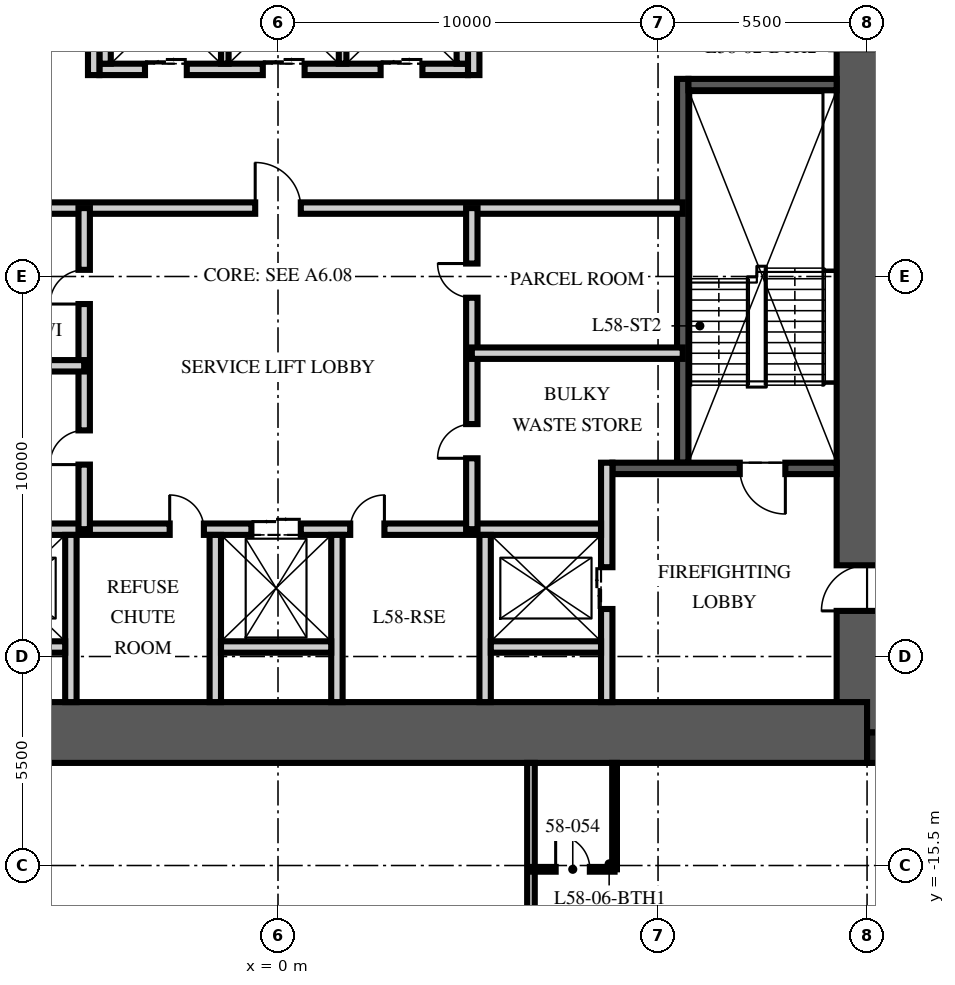
"""IFC4 building model, lengths in metres.
Left out: names, types, materials, properties, quantities, classifications, styles, units other than length and angle.
Written with IfcOpenShell. Run it as: python <this file> out.ifc"""

import sys

from ifc_helpers import new_model, si_unit, direction, frame, frame_2d, origin, origin_2d, place, context, subcontext, project, spatial, rectangle, extrude, element, fill, save


model = new_model("IFC4")
c1 = context("Model", 3, precision=1e-05, world=origin(), true_north=direction((0.0, 1.0)))
c2 = subcontext(c1, "Body", "Model", "MODEL_VIEW")
j1 = project(units=[si_unit("LENGTHUNIT", "METRE"), si_unit("PLANEANGLEUNIT", "RADIAN")], contexts=[c1])
p1 = place(None, origin())
s1 = spatial("IfcSite", under=j1, at=p1, CompositionType="ELEMENT")
p2 = place(p1, origin())
s2 = spatial("IfcBuilding", under=s1, at=p2, CompositionType="ELEMENT")
p3 = place(p2, frame((0.0, 0.0, 233.25)))
s3 = spatial("IfcBuildingStorey", under=s2, at=p3, CompositionType="ELEMENT", Elevation=233.25)
p4 = place(p3, frame((15.5, -12.0, -0.25), z_axis=(0.0, 0.0, 1.0), x_axis=(0.0, 1.0, 0.0)))
e1 = element("IfcWall", 1, at=p4, inside=s3, PredefinedType="SHEAR", context=c2, shape_type="SweptSolid", body=[
    extrude(rectangle(XDim=24.0, YDim=1.6, at=frame_2d((12.0, 0.0))), origin(), (0.0, 0.0, 1.0), 3.75),
])
p5 = place(p4, frame((3.2, 0.0, 0.25)))
e2 = element("IfcOpeningElement", 2, at=p5, cuts=e1, PredefinedType="OPENING", context=c2, shape_type="SweptSolid", body=[
    extrude(rectangle(XDim=1.2, YDim=2.1, at=frame_2d((0.6, 1.05))), frame((0.0, 0.81, 0.0), z_axis=(0.0, -1.0, 0.0), x_axis=(1.0, 0.0, 0.0)), (0.0, 0.0, 1.0), 1.62),
])
p6 = place(p4, frame((19.3, 0.0, 0.25)))
e3 = element("IfcOpeningElement", 3, at=p6, cuts=e1, PredefinedType="OPENING", context=c2, shape_type="SweptSolid", body=[
    extrude(rectangle(XDim=1.8, YDim=2.1, at=frame_2d((0.9, 1.05))), frame((0.0, 0.81, 0.0), z_axis=(0.0, -1.0, 0.0), x_axis=(1.0, 0.0, 0.0)), (0.0, 0.0, 1.0), 1.62),
])
p7 = place(p3, frame((-15.5, -12.0, -0.25), z_axis=(0.0, 0.0, 1.0), x_axis=(1.0, 0.0, 0.0)))
e4 = element("IfcWall", 4, at=p7, inside=s3, PredefinedType="SHEAR", context=c2, shape_type="SweptSolid", body=[
    extrude(rectangle(XDim=31.0, YDim=1.6, at=frame_2d((15.5, 0.0))), origin(), (0.0, 0.0, 1.0), 3.75),
])
p8 = place(p3, frame((15.9, -12.4, -0.25), z_axis=(0.0, 0.0, 1.0), x_axis=(1.0, 0.0, 0.0)))
e5 = element("IfcColumn", 5, at=p8, inside=s3, PredefinedType="COLUMN", context=c2, shape_type="SweptSolid", body=[
    extrude(rectangle(XDim=0.8, YDim=0.8, at=origin_2d()), origin(), (0.0, 0.0, 1.0), 3.75),
])
p9 = place(p3, frame((10.65, -4.9, 0.0), z_axis=(0.0, 0.0, 1.0), x_axis=(0.0, 1.0, 0.0)))
e6 = element("IfcWall", 6, at=p9, inside=s3, PredefinedType="SOLIDWALL", context=c2, shape_type="SweptSolid", body=[
    extrude(rectangle(XDim=10.1, YDim=0.3, at=frame_2d((5.05, 0.0))), origin(), (0.0, 0.0, 1.0), 3.5),
])
p10 = place(p3, frame((14.7, -5.05, 0.0), z_axis=(0.0, 0.0, 1.0), x_axis=(-1.0, 0.0, 0.0)))
e7 = element("IfcWall", 7, at=p10, inside=s3, PredefinedType="SOLIDWALL", context=c2, shape_type="SweptSolid", body=[
    extrude(rectangle(XDim=5.9, YDim=0.3, at=frame_2d((2.95, 0.0))), origin(), (0.0, 0.0, 1.0), 3.5),
])
p11 = place(p10, frame((1.35, 0.0, 0.0)))
e8 = element("IfcOpeningElement", 8, at=p11, cuts=e7, PredefinedType="OPENING", context=c2, shape_type="SweptSolid", body=[
    extrude(rectangle(XDim=1.2, YDim=2.1, at=frame_2d((0.6, 1.05))), frame((0.0, 0.16, 0.0), z_axis=(0.0, -1.0, 0.0), x_axis=(1.0, 0.0, 0.0)), (0.0, 0.0, 1.0), 0.32),
])
p12 = place(p3, frame((14.7, 5.05, 0.0), z_axis=(0.0, 0.0, 1.0), x_axis=(-1.0, 0.0, 0.0)))
e9 = element("IfcWall", 9, at=p12, inside=s3, PredefinedType="SOLIDWALL", context=c2, shape_type="SweptSolid", body=[
    extrude(rectangle(XDim=3.9, YDim=0.3, at=frame_2d((1.95, 0.0))), origin(), (0.0, 0.0, 1.0), 3.5),
])
p13 = place(p3, frame((8.65, -11.2, 0.0), z_axis=(0.0, 0.0, 1.0), x_axis=(0.0, 1.0, 0.0)))
e10 = element("IfcWall", 10, at=p13, inside=s3, PredefinedType="PARTITIONING", context=c2, shape_type="SweptSolid", body=[
    extrude(rectangle(XDim=6.3, YDim=0.3, at=frame_2d((3.15, 0.0))), origin(), (0.0, 0.0, 1.0), 3.5),
])
p14 = place(p13, frame((2.45, 0.0, 0.0)))
e11 = element("IfcOpeningElement", 11, at=p14, cuts=e10, PredefinedType="OPENING", context=c2, shape_type="SweptSolid", body=[
    extrude(rectangle(XDim=1.1, YDim=2.1, at=frame_2d((0.55, 1.05))), frame((0.0, 0.16, 0.0), z_axis=(0.0, -1.0, 0.0), x_axis=(1.0, 0.0, 0.0)), (0.0, 0.0, 1.0), 0.32),
])
p15 = place(p3, frame((-8.5, -6.65, 0.0), z_axis=(0.0, 0.0, 1.0), x_axis=(1.0, 0.0, 0.0)))
e12 = element("IfcWall", 12, at=p15, inside=s3, PredefinedType="PARTITIONING", context=c2, shape_type="SweptSolid", body=[
    extrude(rectangle(XDim=17.0, YDim=0.3, at=frame_2d((8.5, 0.0))), origin(), (0.0, 0.0, 1.0), 3.5),
])
p16 = place(p15, frame((7.8, 0.0, 0.0)))
e13 = element("IfcOpeningElement", 13, at=p16, cuts=e12, PredefinedType="OPENING", context=c2, shape_type="SweptSolid", body=[
    extrude(rectangle(XDim=1.3, YDim=2.4, at=frame_2d((0.65, 1.2))), frame((0.0, 0.16, 0.0), z_axis=(0.0, -1.0, 0.0), x_axis=(1.0, 0.0, 0.0)), (0.0, 0.0, 1.0), 0.32),
])
p17 = place(p15, frame((5.65, 0.0, 0.0)))
e14 = element("IfcOpeningElement", 14, at=p17, cuts=e12, PredefinedType="OPENING", context=c2, shape_type="SweptSolid", body=[
    extrude(rectangle(XDim=0.9, YDim=2.1, at=frame_2d((0.45, 1.05))), frame((0.0, 0.16, 0.0), z_axis=(0.0, -1.0, 0.0), x_axis=(1.0, 0.0, 0.0)), (0.0, 0.0, 1.0), 0.32),
])
p18 = place(p15, frame((10.4, 0.0, 0.0)))
e15 = element("IfcOpeningElement", 15, at=p18, cuts=e12, PredefinedType="OPENING", context=c2, shape_type="SweptSolid", body=[
    extrude(rectangle(XDim=0.9, YDim=2.1, at=frame_2d((0.45, 1.05))), frame((0.0, 0.16, 0.0), z_axis=(0.0, -1.0, 0.0), x_axis=(1.0, 0.0, 0.0)), (0.0, 0.0, 1.0), 0.32),
])
for number, where, z_axis, x_axis in (
    (16, (-5.45, -11.2, 0.0), (0.0, 0.0, 1.0), (0.0, 1.0, 0.0)),
    (17, (-1.65, -11.2, 0.0), (0.0, 0.0, 1.0), (0.0, 1.0, 0.0)),
    (18, (1.55, -11.2, 0.0), (0.0, 0.0, 1.0), (0.0, 1.0, 0.0)),
    (19, (5.45, -11.2, 0.0), (0.0, 0.0, 1.0), (0.0, 1.0, 0.0)),
):
    element("IfcWall", number, at=place(p3, frame(where, z_axis=z_axis, x_axis=x_axis)), inside=s3, PredefinedType="PARTITIONING", context=c2, shape_type="SweptSolid", body=[
        extrude(rectangle(XDim=4.4, YDim=0.3, at=frame_2d((2.2, 0.0))), origin(), (0.0, 0.0, 1.0), 3.5),
    ])
for number, where, z_axis, x_axis in (
    (20, (-8.5, -9.75, 0.0), (0.0, 0.0, 1.0), (1.0, 0.0, 0.0)),
    (21, (-1.5, -9.75, 0.0), (0.0, 0.0, 1.0), (1.0, 0.0, 0.0)),
    (22, (5.6, -9.75, 0.0), (0.0, 0.0, 1.0), (1.0, 0.0, 0.0)),
):
    element("IfcWall", number, at=place(p3, frame(where, z_axis=z_axis, x_axis=x_axis)), inside=s3, PredefinedType="PARTITIONING", context=c2, shape_type="SweptSolid", body=[
        extrude(rectangle(XDim=2.9, YDim=0.3, at=frame_2d((1.45, 0.0))), origin(), (0.0, 0.0, 1.0), 3.5),
    ])
p19 = place(p3, frame((-4.7, 5.45, 0.0), z_axis=(0.0, 0.0, 1.0), x_axis=(1.0, 0.0, 0.0)))
e23 = element("IfcWall", 23, at=p19, inside=s3, PredefinedType="PARTITIONING", context=c2, shape_type="SweptSolid", body=[
    extrude(rectangle(XDim=9.7, YDim=0.3, at=frame_2d((4.85, 0.0))), origin(), (0.0, 0.0, 1.0), 3.5),
])
p20 = place(p19, frame((1.2, 0.0, 0.0)))
e24 = element("IfcOpeningElement", 24, at=p20, cuts=e23, PredefinedType="OPENING", context=c2, shape_type="SweptSolid", body=[
    extrude(rectangle(XDim=1.1, YDim=2.1, at=frame_2d((0.55, 1.05))), frame((0.0, 0.16, 0.0), z_axis=(0.0, -1.0, 0.0), x_axis=(1.0, 0.0, 0.0)), (0.0, 0.0, 1.0), 0.32),
])
p21 = place(p19, frame((4.3, 0.0, 0.0)))
e25 = element("IfcOpeningElement", 25, at=p21, cuts=e23, PredefinedType="OPENING", context=c2, shape_type="SweptSolid", body=[
    extrude(rectangle(XDim=1.1, YDim=2.1, at=frame_2d((0.55, 1.05))), frame((0.0, 0.16, 0.0), z_axis=(0.0, -1.0, 0.0), x_axis=(1.0, 0.0, 0.0)), (0.0, 0.0, 1.0), 0.32),
])
p22 = place(p19, frame((7.4, 0.0, 0.0)))
e26 = element("IfcOpeningElement", 26, at=p22, cuts=e23, PredefinedType="OPENING", context=c2, shape_type="SweptSolid", body=[
    extrude(rectangle(XDim=1.1, YDim=2.1, at=frame_2d((0.55, 1.05))), frame((0.0, 0.16, 0.0), z_axis=(0.0, -1.0, 0.0), x_axis=(1.0, 0.0, 0.0)), (0.0, 0.0, 1.0), 0.32),
])
for number, where, z_axis, x_axis in (
    (27, (-4.55, 5.6, 0.0), (0.0, 0.0, 1.0), (0.0, 1.0, 0.0)),
    (28, (4.85, 5.6, 0.0), (0.0, 0.0, 1.0), (0.0, 1.0, 0.0)),
):
    element("IfcWall", number, at=place(p3, frame(where, z_axis=z_axis, x_axis=x_axis)), inside=s3, PredefinedType="PARTITIONING", context=c2, shape_type="SweptSolid", body=[
        extrude(rectangle(XDim=2.8, YDim=0.3, at=frame_2d((1.4, 0.0))), origin(), (0.0, 0.0, 1.0), 3.5),
    ])
for number, where, z_axis, x_axis in (
    (29, (-1.4, 5.6, 0.0), (0.0, 0.0, 1.0), (0.0, 1.0, 0.0)),
    (30, (1.7, 5.6, 0.0), (0.0, 0.0, 1.0), (0.0, 1.0, 0.0)),
):
    element("IfcWall", number, at=place(p3, frame(where, z_axis=z_axis, x_axis=x_axis)), inside=s3, PredefinedType="PARTITIONING", context=c2, shape_type="SweptSolid", body=[
        extrude(rectangle(XDim=2.8, YDim=0.2, at=frame_2d((1.4, 0.0))), origin(), (0.0, 0.0, 1.0), 3.5),
    ])
p23 = place(p3, frame((-10.65, 1.8, 0.0), z_axis=(0.0, 0.0, 1.0), x_axis=(1.0, 0.0, 0.0)))
e31 = element("IfcWall", 31, at=p23, inside=s3, PredefinedType="PARTITIONING", context=c2, shape_type="SweptSolid", body=[
    extrude(rectangle(XDim=21.3, YDim=0.3, at=frame_2d((10.65, 0.0))), origin(), (0.0, 0.0, 1.0), 3.5),
])
p24 = place(p23, frame((10.05, 0.0, 0.0)))
e32 = element("IfcOpeningElement", 32, at=p24, cuts=e31, PredefinedType="OPENING", context=c2, shape_type="SweptSolid", body=[
    extrude(rectangle(XDim=1.2, YDim=2.1, at=frame_2d((0.6, 1.05))), frame((0.0, 0.16, 0.0), z_axis=(0.0, -1.0, 0.0), x_axis=(1.0, 0.0, 0.0)), (0.0, 0.0, 1.0), 0.32),
])
p25 = place(p23, frame((0.938, 0.0, 0.0)))
e33 = element("IfcOpeningElement", 33, at=p25, cuts=e31, PredefinedType="OPENING", context=c2, shape_type="SweptSolid", body=[
    extrude(rectangle(XDim=0.9, YDim=2.1, at=frame_2d((0.45, 1.05))), frame((0.0, 0.16, 0.0), z_axis=(0.0, -1.0, 0.0), x_axis=(1.0, 0.0, 0.0)), (0.0, 0.0, 1.0), 0.32),
])
p26 = place(p3, frame((-5.1, -6.65, 0.0), z_axis=(0.0, 0.0, 1.0), x_axis=(0.0, 1.0, 0.0)))
e34 = element("IfcWall", 34, at=p26, inside=s3, PredefinedType="PARTITIONING", context=c2, shape_type="SweptSolid", body=[
    extrude(rectangle(XDim=8.45, YDim=0.3, at=frame_2d((4.225, 0.0))), origin(), (0.0, 0.0, 1.0), 3.5),
])
p27 = place(p26, frame((1.7, 0.0, 0.0)))
e35 = element("IfcOpeningElement", 35, at=p27, cuts=e34, PredefinedType="OPENING", context=c2, shape_type="SweptSolid", body=[
    extrude(rectangle(XDim=0.9, YDim=2.1, at=frame_2d((0.45, 1.05))), frame((0.0, 0.16, 0.0), z_axis=(0.0, -1.0, 0.0), x_axis=(1.0, 0.0, 0.0)), (0.0, 0.0, 1.0), 0.32),
])
p28 = place(p26, frame((5.925, 0.0, 0.0)))
e36 = element("IfcOpeningElement", 36, at=p28, cuts=e34, PredefinedType="OPENING", context=c2, shape_type="SweptSolid", body=[
    extrude(rectangle(XDim=0.9, YDim=2.1, at=frame_2d((0.45, 1.05))), frame((0.0, 0.16, 0.0), z_axis=(0.0, -1.0, 0.0), x_axis=(1.0, 0.0, 0.0)), (0.0, 0.0, 1.0), 0.32),
])
p29 = place(p3, frame((5.1, -6.65, 0.0), z_axis=(0.0, 0.0, 1.0), x_axis=(0.0, 1.0, 0.0)))
e37 = element("IfcWall", 37, at=p29, inside=s3, PredefinedType="PARTITIONING", context=c2, shape_type="SweptSolid", body=[
    extrude(rectangle(XDim=8.45, YDim=0.3, at=frame_2d((4.225, 0.0))), origin(), (0.0, 0.0, 1.0), 3.5),
])
p30 = place(p29, frame((1.866, 0.0, 0.0)))
e38 = element("IfcOpeningElement", 38, at=p30, cuts=e37, PredefinedType="OPENING", context=c2, shape_type="SweptSolid", body=[
    extrude(rectangle(XDim=0.9, YDim=2.1, at=frame_2d((0.45, 1.05))), frame((0.0, 0.16, 0.0), z_axis=(0.0, -1.0, 0.0), x_axis=(1.0, 0.0, 0.0)), (0.0, 0.0, 1.0), 0.32),
])
p31 = place(p29, frame((6.091, 0.0, 0.0)))
e39 = element("IfcOpeningElement", 39, at=p31, cuts=e37, PredefinedType="OPENING", context=c2, shape_type="SweptSolid", body=[
    extrude(rectangle(XDim=0.9, YDim=2.1, at=frame_2d((0.45, 1.05))), frame((0.0, 0.16, 0.0), z_axis=(0.0, -1.0, 0.0), x_axis=(1.0, 0.0, 0.0)), (0.0, 0.0, 1.0), 0.32),
])
for number, where, z_axis, x_axis in (
    (40, (-10.65, -2.35, 0.0), (0.0, 0.0, 1.0), (1.0, 0.0, 0.0)),
    (41, (10.65, -2.018, 0.0), (0.0, 0.0, 1.0), (-1.0, 0.0, 0.0)),
):
    element("IfcWall", number, at=place(p3, frame(where, z_axis=z_axis, x_axis=x_axis)), inside=s3, PredefinedType="PARTITIONING", context=c2, shape_type="SweptSolid", body=[
        extrude(rectangle(XDim=5.55, YDim=0.3, at=frame_2d((2.775, 0.0))), origin(), (0.0, 0.0, 1.0), 3.5),
    ])
p32 = place(p3, frame((-4.85, 5.3, 0.0), z_axis=(0.0, 0.0, 1.0), x_axis=(0.0, 1.0, 0.0)))
e42 = element("IfcWall", 42, at=p32, inside=s3, PredefinedType="PARTITIONING", context=c2, shape_type="SweptSolid", body=[
    extrude(rectangle(XDim=5.9, YDim=0.3, at=frame_2d((2.95, 0.0))), origin(), (0.0, 0.0, 1.0), 3.5),
])
p33 = place(p32, frame((4.15, 0.0, 0.0)))
e43 = element("IfcOpeningElement", 43, at=p33, cuts=e42, PredefinedType="OPENING", context=c2, shape_type="SweptSolid", body=[
    extrude(rectangle(XDim=0.9, YDim=2.1, at=frame_2d((0.45, 1.05))), frame((0.0, 0.16, 0.0), z_axis=(0.0, -1.0, 0.0), x_axis=(1.0, 0.0, 0.0)), (0.0, 0.0, 1.0), 0.32),
])
p34 = place(p3, frame((5.15, 5.3, 0.0), z_axis=(0.0, 0.0, 1.0), x_axis=(0.0, 1.0, 0.0)))
e44 = element("IfcWall", 44, at=p34, inside=s3, PredefinedType="PARTITIONING", context=c2, shape_type="SweptSolid", body=[
    extrude(rectangle(XDim=5.9, YDim=0.3, at=frame_2d((2.95, 0.0))), origin(), (0.0, 0.0, 1.0), 3.5),
])
p35 = place(p34, frame((4.15, 0.0, 0.0)))
e45 = element("IfcOpeningElement", 45, at=p35, cuts=e44, PredefinedType="OPENING", context=c2, shape_type="SweptSolid", body=[
    extrude(rectangle(XDim=0.9, YDim=2.1, at=frame_2d((0.45, 1.05))), frame((0.0, 0.16, 0.0), z_axis=(0.0, -1.0, 0.0), x_axis=(1.0, 0.0, 0.0)), (0.0, 0.0, 1.0), 0.32),
])
p36 = place(p3, frame((6.656, -12.8, 0.0), z_axis=(0.0, 0.0, 1.0), x_axis=(0.0, -1.0, 0.0)))
e46 = element("IfcWall", 46, at=p36, inside=s3, PredefinedType="PARTITIONING", context=c2, shape_type="SweptSolid", body=[
    extrude(rectangle(XDim=13.15, YDim=0.2, at=frame_2d((6.575, 0.0))), origin(), (0.0, 0.0, 1.0), 2.91),
])
p37 = place(p3, frame((6.656, -15.6, 0.0), z_axis=(0.0, 0.0, 1.0), x_axis=(1.0, 0.0, 0.0)))
e47 = element("IfcWall", 47, at=p37, inside=s3, PredefinedType="PARTITIONING", context=c2, shape_type="SweptSolid", body=[
    extrude(rectangle(XDim=2.2, YDim=0.125, at=frame_2d((1.1, 0.0))), origin(), (0.0, 0.0, 1.0), 2.6),
])
p38 = place(p37, frame((0.65, 0.0, 0.0)))
e48 = element("IfcOpeningElement", 48, at=p38, cuts=e47, PredefinedType="OPENING", context=c2, shape_type="SweptSolid", body=[
    extrude(rectangle(XDim=0.9, YDim=2.1, at=frame_2d((0.45, 1.05))), frame((0.0, 0.073, 0.0), z_axis=(0.0, -1.0, 0.0), x_axis=(1.0, 0.0, 0.0)), (0.0, 0.0, 1.0), 0.145),
])
p39 = place(p3, frame((8.856, -12.8, 0.0), z_axis=(0.0, 0.0, 1.0), x_axis=(0.0, -1.0, 0.0)))
e49 = element("IfcWall", 49, at=p39, inside=s3, PredefinedType="PARTITIONING", context=c2, shape_type="SweptSolid", body=[
    extrude(rectangle(XDim=2.8, YDim=0.125, at=frame_2d((1.4, 0.0))), origin(), (0.0, 0.0, 1.0), 3.5),
])
p40 = place(p11, origin())
e50 = element("IfcDoor", 50, at=p40, inside=s3, OperationType="SINGLE_SWING_LEFT", PredefinedType="DOOR", context=c2, shape_type="SweptSolid", body=[
    extrude(rectangle(XDim=1.2, YDim=2.1, at=frame_2d((0.6, 1.05))), frame((0.0, 0.025, 0.0), z_axis=(0.0, -1.0, 0.0), x_axis=(1.0, 0.0, 0.0)), (0.0, 0.0, 1.0), 0.05),
])
fill(e8, e50)
p41 = place(p5, origin())
e51 = element("IfcDoor", 51, at=p41, inside=s3, OperationType="SINGLE_SWING_LEFT", PredefinedType="DOOR", context=c2, shape_type="SweptSolid", body=[
    extrude(rectangle(XDim=1.2, YDim=2.1, at=frame_2d((0.6, 1.05))), frame((0.0, 0.025, 0.0), z_axis=(0.0, -1.0, 0.0), x_axis=(1.0, 0.0, 0.0)), (0.0, 0.0, 1.0), 0.05),
])
fill(e2, e51)
p42 = place(p14, origin())
e52 = element("IfcDoor", 52, at=p42, inside=s3, OperationType="DOUBLE_DOOR_SLIDING", PredefinedType="DOOR", context=c2, shape_type="SweptSolid", body=[
    extrude(rectangle(XDim=1.1, YDim=2.1, at=frame_2d((0.55, 1.05))), frame((0.0, 0.025, 0.0), z_axis=(0.0, -1.0, 0.0), x_axis=(1.0, 0.0, 0.0)), (0.0, 0.0, 1.0), 0.05),
])
fill(e11, e52)
p43 = place(p20, origin())
e53 = element("IfcDoor", 53, at=p43, inside=s3, OperationType="DOUBLE_DOOR_SLIDING", PredefinedType="DOOR", context=c2, shape_type="SweptSolid", body=[
    extrude(rectangle(XDim=1.1, YDim=2.1, at=frame_2d((0.55, 1.05))), frame((0.0, 0.025, 0.0), z_axis=(0.0, -1.0, 0.0), x_axis=(1.0, 0.0, 0.0)), (0.0, 0.0, 1.0), 0.05),
])
fill(e24, e53)
p44 = place(p21, origin())
e54 = element("IfcDoor", 54, at=p44, inside=s3, OperationType="DOUBLE_DOOR_SLIDING", PredefinedType="DOOR", context=c2, shape_type="SweptSolid", body=[
    extrude(rectangle(XDim=1.1, YDim=2.1, at=frame_2d((0.55, 1.05))), frame((0.0, 0.025, 0.0), z_axis=(0.0, -1.0, 0.0), x_axis=(1.0, 0.0, 0.0)), (0.0, 0.0, 1.0), 0.05),
])
fill(e25, e54)
p45 = place(p22, origin())
e55 = element("IfcDoor", 55, at=p45, inside=s3, OperationType="DOUBLE_DOOR_SLIDING", PredefinedType="DOOR", context=c2, shape_type="SweptSolid", body=[
    extrude(rectangle(XDim=1.1, YDim=2.1, at=frame_2d((0.55, 1.05))), frame((0.0, 0.025, 0.0), z_axis=(0.0, -1.0, 0.0), x_axis=(1.0, 0.0, 0.0)), (0.0, 0.0, 1.0), 0.05),
])
fill(e26, e55)
p46 = place(p16, origin())
e56 = element("IfcDoor", 56, at=p46, inside=s3, OperationType="DOUBLE_DOOR_SLIDING", PredefinedType="DOOR", context=c2, shape_type="SweptSolid", body=[
    extrude(rectangle(XDim=1.3, YDim=2.4, at=frame_2d((0.65, 1.2))), frame((0.0, 0.025, 0.0), z_axis=(0.0, -1.0, 0.0), x_axis=(1.0, 0.0, 0.0)), (0.0, 0.0, 1.0), 0.05),
])
fill(e13, e56)
p47 = place(p24, origin())
e57 = element("IfcDoor", 57, at=p47, inside=s3, OperationType="SINGLE_SWING_LEFT", PredefinedType="DOOR", context=c2, shape_type="SweptSolid", body=[
    extrude(rectangle(XDim=1.2, YDim=2.1, at=frame_2d((0.6, 1.05))), frame((0.0, 0.025, 0.0), z_axis=(0.0, -1.0, 0.0), x_axis=(1.0, 0.0, 0.0)), (0.0, 0.0, 1.0), 0.05),
])
fill(e32, e57)
p48 = place(p17, origin())
e58 = element("IfcDoor", 58, at=p48, inside=s3, OperationType="SINGLE_SWING_LEFT", PredefinedType="DOOR", context=c2, shape_type="SweptSolid", body=[
    extrude(rectangle(XDim=0.9, YDim=2.1, at=frame_2d((0.45, 1.05))), frame((0.0, 0.025, 0.0), z_axis=(0.0, -1.0, 0.0), x_axis=(1.0, 0.0, 0.0)), (0.0, 0.0, 1.0), 0.05),
])
fill(e14, e58)
p49 = place(p18, origin())
e59 = element("IfcDoor", 59, at=p49, inside=s3, OperationType="SINGLE_SWING_RIGHT", PredefinedType="DOOR", context=c2, shape_type="SweptSolid", body=[
    extrude(rectangle(XDim=0.9, YDim=2.1, at=frame_2d((0.45, 1.05))), frame((0.0, 0.025, 0.0), z_axis=(0.0, -1.0, 0.0), x_axis=(1.0, 0.0, 0.0)), (0.0, 0.0, 1.0), 0.05),
])
fill(e15, e59)
p50 = place(p27, origin())
e60 = element("IfcDoor", 60, at=p50, inside=s3, OperationType="SINGLE_SWING_LEFT", PredefinedType="DOOR", context=c2, shape_type="SweptSolid", body=[
    extrude(rectangle(XDim=0.9, YDim=2.1, at=frame_2d((0.45, 1.05))), frame((0.0, 0.025, 0.0), z_axis=(0.0, -1.0, 0.0), x_axis=(1.0, 0.0, 0.0)), (0.0, 0.0, 1.0), 0.05),
])
fill(e35, e60)
p51 = place(p28, origin())
e61 = element("IfcDoor", 61, at=p51, inside=s3, OperationType="SINGLE_SWING_LEFT", PredefinedType="DOOR", context=c2, shape_type="SweptSolid", body=[
    extrude(rectangle(XDim=0.9, YDim=2.1, at=frame_2d((0.45, 1.05))), frame((0.0, 0.025, 0.0), z_axis=(0.0, -1.0, 0.0), x_axis=(1.0, 0.0, 0.0)), (0.0, 0.0, 1.0), 0.05),
])
fill(e36, e61)
p52 = place(p30, origin())
e62 = element("IfcDoor", 62, at=p52, inside=s3, OperationType="SINGLE_SWING_LEFT", PredefinedType="DOOR", context=c2, shape_type="SweptSolid", body=[
    extrude(rectangle(XDim=0.9, YDim=2.1, at=frame_2d((0.45, 1.05))), frame((0.0, 0.025, 0.0), z_axis=(0.0, -1.0, 0.0), x_axis=(1.0, 0.0, 0.0)), (0.0, 0.0, 1.0), 0.05),
])
fill(e38, e62)
p53 = place(p31, origin())
e63 = element("IfcDoor", 63, at=p53, inside=s3, OperationType="SINGLE_SWING_RIGHT", PredefinedType="DOOR", context=c2, shape_type="SweptSolid", body=[
    extrude(rectangle(XDim=0.9, YDim=2.1, at=frame_2d((0.45, 1.05))), frame((0.0, 0.025, 0.0), z_axis=(0.0, -1.0, 0.0), x_axis=(1.0, 0.0, 0.0)), (0.0, 0.0, 1.0), 0.05),
])
fill(e39, e63)
p54 = place(p38, origin())
e64 = element("IfcDoor", 64, at=p54, inside=s3, OperationType="SINGLE_SWING_LEFT", PredefinedType="DOOR", context=c2, shape_type="SweptSolid", body=[
    extrude(rectangle(XDim=0.9, YDim=2.1, at=frame_2d((0.45, 1.05))), frame((0.0, 0.025, 0.0), z_axis=(0.0, -1.0, 0.0), x_axis=(1.0, 0.0, 0.0)), (0.0, 0.0, 1.0), 0.05),
])
fill(e48, e64)
save(model, sys.argv[1])
